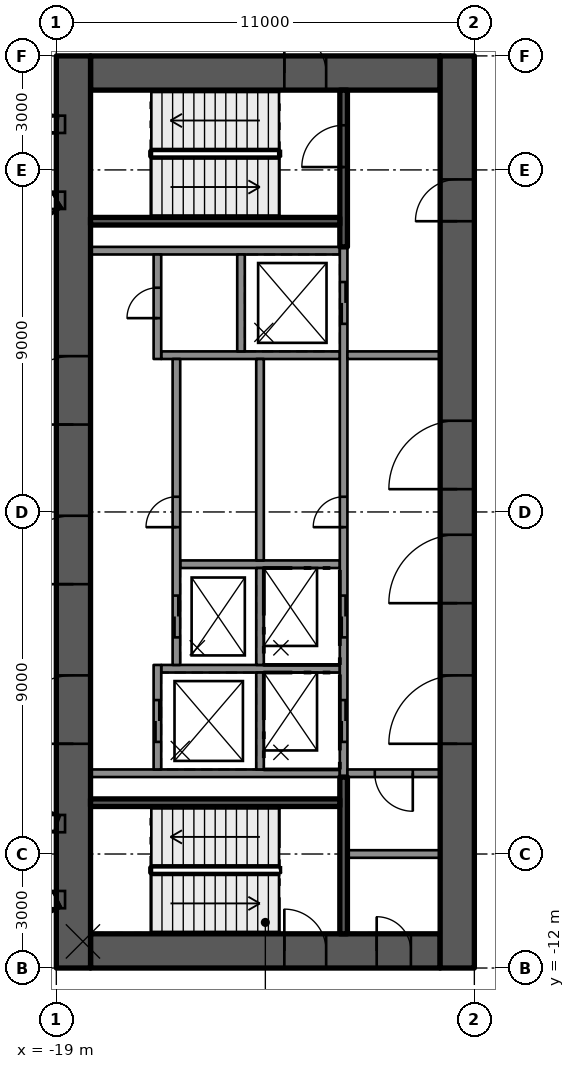
"""IFC4 building model, lengths in metres.
Left out: names, types, materials, properties, quantities, classifications, styles, units other than length and angle.
Written with IfcOpenShell. Run it as: python <this file> out.ifc"""

import sys

from ifc_helpers import new_model, si_unit, direction, frame, frame_2d, origin, place, context, subcontext, project, spatial, rectangle, extrude, element, fill, save


model = new_model("IFC4")
c1 = context("Model", 3, precision=1e-05, world=origin(), true_north=direction((0.0, 1.0)))
c2 = subcontext(c1, "Body", "Model", "MODEL_VIEW")
j1 = project(units=[si_unit("LENGTHUNIT", "METRE"), si_unit("PLANEANGLEUNIT", "RADIAN")], contexts=[c1])
p1 = place(None, origin())
s1 = spatial("IfcSite", under=j1, at=p1, CompositionType="ELEMENT")
p2 = place(p1, origin())
s2 = spatial("IfcBuilding", under=s1, at=p2, CompositionType="ELEMENT")
p3 = place(p2, frame((0.0, 0.0, 206.1)))
s3 = spatial("IfcBuildingStorey", under=s2, at=p3, CompositionType="ELEMENT", Elevation=206.1)
p4 = place(p3, frame((-18.1, 11.55, 0.0), z_axis=(0.0, 0.0, 1.0), x_axis=(1.0, 0.0, 0.0)))
e1 = element("IfcWall", 1, at=p4, inside=s3, PredefinedType="SHEAR", context=c2, shape_type="SweptSolid", body=[
    extrude(rectangle(XDim=9.2, YDim=0.9, at=frame_2d((4.6, 0.0))), origin(), (0.0, 0.0, 1.0), 4.4),
])
p5 = place(p4, frame((5.1, 0.0, 0.0)))
e2 = element("IfcOpeningElement", 2, at=p5, cuts=e1, PredefinedType="OPENING", context=c2, shape_type="SweptSolid", body=[
    extrude(rectangle(XDim=1.1, YDim=2.1, at=frame_2d((0.55, 1.05))), frame((0.0, 0.46, 0.0), z_axis=(0.0, -1.0, 0.0), x_axis=(1.0, 0.0, 0.0)), (0.0, 0.0, 1.0), 0.92),
])
p6 = place(p3, frame((-18.1, -11.55, 0.0), z_axis=(0.0, 0.0, 1.0), x_axis=(1.0, 0.0, 0.0)))
e3 = element("IfcWall", 3, at=p6, inside=s3, PredefinedType="SHEAR", context=c2, shape_type="SweptSolid", body=[
    extrude(rectangle(XDim=9.2, YDim=0.9, at=frame_2d((4.6, 0.0))), origin(), (0.0, 0.0, 1.0), 4.4),
])
p7 = place(p6, frame((5.1, 0.0, 0.0)))
e4 = element("IfcOpeningElement", 4, at=p7, cuts=e3, PredefinedType="OPENING", context=c2, shape_type="SweptSolid", body=[
    extrude(rectangle(XDim=1.1, YDim=2.1, at=frame_2d((0.55, 1.05))), frame((0.0, 0.46, 0.0), z_axis=(0.0, -1.0, 0.0), x_axis=(1.0, 0.0, 0.0)), (0.0, 0.0, 1.0), 0.92),
])
p8 = place(p6, frame((7.53, 0.0, 0.0)))
e5 = element("IfcOpeningElement", 5, at=p8, cuts=e3, PredefinedType="OPENING", context=c2, shape_type="SweptSolid", body=[
    extrude(rectangle(XDim=0.9, YDim=2.1, at=frame_2d((0.45, 1.05))), frame((0.0, 0.46, 0.0), z_axis=(0.0, -1.0, 0.0), x_axis=(1.0, 0.0, 0.0)), (0.0, 0.0, 1.0), 0.92),
])
p9 = place(p3, frame((-18.55, -12.0, 0.0), z_axis=(0.0, 0.0, 1.0), x_axis=(0.0, 1.0, 0.0)))
e6 = element("IfcWall", 6, at=p9, inside=s3, PredefinedType="SHEAR", context=c2, shape_type="SweptSolid", body=[
    extrude(rectangle(XDim=24.0, YDim=0.9, at=frame_2d((12.0, 0.0))), origin(), (0.0, 0.0, 1.0), 4.4),
])
p10 = place(p9, frame((5.9, 0.0, 0.0)))
e7 = element("IfcOpeningElement", 7, at=p10, cuts=e6, PredefinedType="OPENING", context=c2, shape_type="SweptSolid", body=[
    extrude(rectangle(XDim=1.8, YDim=2.1, at=frame_2d((0.9, 1.05))), frame((0.0, 0.46, 0.0), z_axis=(0.0, -1.0, 0.0), x_axis=(1.0, 0.0, 0.0)), (0.0, 0.0, 1.0), 0.92),
])
p11 = place(p9, frame((10.1, 0.0, 0.0)))
e8 = element("IfcOpeningElement", 8, at=p11, cuts=e6, PredefinedType="OPENING", context=c2, shape_type="SweptSolid", body=[
    extrude(rectangle(XDim=1.8, YDim=2.1, at=frame_2d((0.9, 1.05))), frame((0.0, 0.46, 0.0), z_axis=(0.0, -1.0, 0.0), x_axis=(1.0, 0.0, 0.0)), (0.0, 0.0, 1.0), 0.92),
])
p12 = place(p9, frame((14.3, 0.0, 0.0)))
e9 = element("IfcOpeningElement", 9, at=p12, cuts=e6, PredefinedType="OPENING", context=c2, shape_type="SweptSolid", body=[
    extrude(rectangle(XDim=1.8, YDim=2.1, at=frame_2d((0.9, 1.05))), frame((0.0, 0.46, 0.0), z_axis=(0.0, -1.0, 0.0), x_axis=(1.0, 0.0, 0.0)), (0.0, 0.0, 1.0), 0.92),
])
p13 = place(p3, frame((-8.45, -12.0, 0.0), z_axis=(0.0, 0.0, 1.0), x_axis=(0.0, 1.0, 0.0)))
e10 = element("IfcWall", 10, at=p13, inside=s3, PredefinedType="SHEAR", context=c2, shape_type="SweptSolid", body=[
    extrude(rectangle(XDim=24.0, YDim=0.9, at=frame_2d((12.0, 0.0))), origin(), (0.0, 0.0, 1.0), 4.4),
])
p14 = place(p13, frame((9.6, 0.0, 0.0)))
e11 = element("IfcOpeningElement", 11, at=p14, cuts=e10, PredefinedType="OPENING", context=c2, shape_type="SweptSolid", body=[
    extrude(rectangle(XDim=1.8, YDim=2.1, at=frame_2d((0.9, 1.05))), frame((0.0, 0.46, 0.0), z_axis=(0.0, -1.0, 0.0), x_axis=(1.0, 0.0, 0.0)), (0.0, 0.0, 1.0), 0.92),
])
p15 = place(p13, frame((5.9, 0.0, 0.0)))
e12 = element("IfcOpeningElement", 12, at=p15, cuts=e10, PredefinedType="OPENING", context=c2, shape_type="SweptSolid", body=[
    extrude(rectangle(XDim=1.8, YDim=2.1, at=frame_2d((0.9, 1.05))), frame((0.0, 0.46, 0.0), z_axis=(0.0, -1.0, 0.0), x_axis=(1.0, 0.0, 0.0)), (0.0, 0.0, 1.0), 0.92),
])
p16 = place(p13, frame((12.6, 0.0, 0.0)))
e13 = element("IfcOpeningElement", 13, at=p16, cuts=e10, PredefinedType="OPENING", context=c2, shape_type="SweptSolid", body=[
    extrude(rectangle(XDim=1.8, YDim=2.1, at=frame_2d((0.9, 1.05))), frame((0.0, 0.46, 0.0), z_axis=(0.0, -1.0, 0.0), x_axis=(1.0, 0.0, 0.0)), (0.0, 0.0, 1.0), 0.92),
])
p17 = place(p13, frame((19.65, 0.0, 0.0)))
e14 = element("IfcOpeningElement", 14, at=p17, cuts=e10, PredefinedType="OPENING", context=c2, shape_type="SweptSolid", body=[
    extrude(rectangle(XDim=1.1, YDim=2.1, at=frame_2d((0.55, 1.05))), frame((0.0, 0.46, 0.0), z_axis=(0.0, -1.0, 0.0), x_axis=(1.0, 0.0, 0.0)), (0.0, 0.0, 1.0), 0.92),
])
for number, where, z_axis, x_axis in (
    (15, (-11.54, 6.875, 0.0), (0.0, 0.0, 1.0), (-1.0, 0.0, 0.0)),
    (16, (-11.54, -6.875, 0.0), (0.0, 0.0, 1.0), (-1.0, 0.0, 0.0)),
):
    element("IfcWall", number, at=place(p3, frame(where, z_axis=z_axis, x_axis=x_axis)), inside=s3, PredefinedType="SOLIDWALL", context=c2, shape_type="SweptSolid", body=[
        extrude(rectangle(XDim=6.56, YDim=0.2, at=frame_2d((3.28, 0.0))), origin(), (0.0, 0.0, 1.0), 3.99),
    ])
p18 = place(p3, frame((-11.54, -4.125, 0.0), z_axis=(0.0, 0.0, 1.0), x_axis=(-1.0, 0.0, 0.0)))
e17 = element("IfcWall", 17, at=p18, inside=s3, PredefinedType="SOLIDWALL", context=c2, shape_type="SweptSolid", body=[
    extrude(rectangle(XDim=4.7, YDim=0.2, at=frame_2d((2.35, 0.0))), origin(), (0.0, 0.0, 1.0), 3.99),
])
p19 = place(p3, frame((-11.54, -1.375, 0.0), z_axis=(0.0, 0.0, 1.0), x_axis=(-1.0, 0.0, 0.0)))
e18 = element("IfcWall", 18, at=p19, inside=s3, PredefinedType="SOLIDWALL", context=c2, shape_type="SweptSolid", body=[
    extrude(rectangle(XDim=4.2, YDim=0.2, at=frame_2d((2.1, 0.0))), origin(), (0.0, 0.0, 1.0), 3.99),
])
p20 = place(p3, frame((-11.54, 4.125, 0.0), z_axis=(0.0, 0.0, 1.0), x_axis=(-1.0, 0.0, 0.0)))
e19 = element("IfcWall", 19, at=p20, inside=s3, PredefinedType="SOLIDWALL", context=c2, shape_type="SweptSolid", body=[
    extrude(rectangle(XDim=4.7, YDim=0.2, at=frame_2d((2.35, 0.0))), origin(), (0.0, 0.0, 1.0), 3.99),
])
p21 = place(p3, frame((-11.44, -6.975, 0.0), z_axis=(0.0, 0.0, 1.0), x_axis=(0.0, 1.0, 0.0)))
e20 = element("IfcWall", 20, at=p21, inside=s3, PredefinedType="SOLIDWALL", context=c2, shape_type="SweptSolid", body=[
    extrude(rectangle(XDim=13.95, YDim=0.2, at=frame_2d((6.975, 0.0))), origin(), (0.0, 0.0, 1.0), 3.99),
])
p22 = place(p21, frame((0.925, 0.0, 0.0)))
e21 = element("IfcOpeningElement", 21, at=p22, cuts=e20, PredefinedType="OPENING", context=c2, shape_type="SweptSolid", body=[
    extrude(rectangle(XDim=1.1, YDim=2.1, at=frame_2d((0.55, 1.05))), frame((0.0, 0.11, 0.0), z_axis=(0.0, -1.0, 0.0), x_axis=(1.0, 0.0, 0.0)), (0.0, 0.0, 1.0), 0.22),
])
p23 = place(p21, frame((3.675, 0.0, 0.0)))
e22 = element("IfcOpeningElement", 22, at=p23, cuts=e20, PredefinedType="OPENING", context=c2, shape_type="SweptSolid", body=[
    extrude(rectangle(XDim=1.1, YDim=2.1, at=frame_2d((0.55, 1.05))), frame((0.0, 0.11, 0.0), z_axis=(0.0, -1.0, 0.0), x_axis=(1.0, 0.0, 0.0)), (0.0, 0.0, 1.0), 0.22),
])
p24 = place(p21, frame((11.925, 0.0, 0.0)))
e23 = element("IfcOpeningElement", 23, at=p24, cuts=e20, PredefinedType="OPENING", context=c2, shape_type="SweptSolid", body=[
    extrude(rectangle(XDim=1.1, YDim=2.1, at=frame_2d((0.55, 1.05))), frame((0.0, 0.11, 0.0), z_axis=(0.0, -1.0, 0.0), x_axis=(1.0, 0.0, 0.0)), (0.0, 0.0, 1.0), 0.22),
])
p25 = place(p21, frame((6.575, 0.0, 0.0)))
e24 = element("IfcOpeningElement", 24, at=p25, cuts=e20, PredefinedType="OPENING", context=c2, shape_type="SweptSolid", body=[
    extrude(rectangle(XDim=0.8, YDim=2.1, at=frame_2d((0.4, 1.05))), frame((0.0, 0.11, 0.0), z_axis=(0.0, -1.0, 0.0), x_axis=(1.0, 0.0, 0.0)), (0.0, 0.0, 1.0), 0.22),
])
for number, where, z_axis, x_axis in (
    (25, (-13.64, -6.775, 0.0), (0.0, 0.0, 1.0), (0.0, 1.0, 0.0)),
    (26, (-13.64, -4.025, 0.0), (0.0, 0.0, 1.0), (0.0, 1.0, 0.0)),
):
    element("IfcWall", number, at=place(p3, frame(where, z_axis=z_axis, x_axis=x_axis)), inside=s3, PredefinedType="SOLIDWALL", context=c2, shape_type="SweptSolid", body=[
        extrude(rectangle(XDim=2.55, YDim=0.2, at=frame_2d((1.275, 0.0))), origin(), (0.0, 0.0, 1.0), 3.99),
    ])
p26 = place(p3, frame((-13.64, -1.275, 0.0), z_axis=(0.0, 0.0, 1.0), x_axis=(0.0, 1.0, 0.0)))
e27 = element("IfcWall", 27, at=p26, inside=s3, PredefinedType="SOLIDWALL", context=c2, shape_type="SweptSolid", body=[
    extrude(rectangle(XDim=5.3, YDim=0.2, at=frame_2d((2.65, 0.0))), origin(), (0.0, 0.0, 1.0), 3.99),
])
p27 = place(p3, frame((-14.14, 4.225, 0.0), z_axis=(0.0, 0.0, 1.0), x_axis=(0.0, 1.0, 0.0)))
e28 = element("IfcWall", 28, at=p27, inside=s3, PredefinedType="SOLIDWALL", context=c2, shape_type="SweptSolid", body=[
    extrude(rectangle(XDim=2.55, YDim=0.2, at=frame_2d((1.275, 0.0))), origin(), (0.0, 0.0, 1.0), 3.99),
])
p28 = place(p3, frame((-16.34, -6.775, 0.0), z_axis=(0.0, 0.0, 1.0), x_axis=(0.0, 1.0, 0.0)))
e29 = element("IfcWall", 29, at=p28, inside=s3, PredefinedType="SOLIDWALL", context=c2, shape_type="SweptSolid", body=[
    extrude(rectangle(XDim=2.75, YDim=0.2, at=frame_2d((1.375, 0.0))), origin(), (0.0, 0.0, 1.0), 3.99),
])
p29 = place(p28, frame((0.725, 0.0, 0.0)))
e30 = element("IfcOpeningElement", 30, at=p29, cuts=e29, PredefinedType="OPENING", context=c2, shape_type="SweptSolid", body=[
    extrude(rectangle(XDim=1.1, YDim=2.1, at=frame_2d((0.55, 1.05))), frame((0.0, 0.11, 0.0), z_axis=(0.0, -1.0, 0.0), x_axis=(1.0, 0.0, 0.0)), (0.0, 0.0, 1.0), 0.22),
])
p30 = place(p3, frame((-15.84, -4.025, 0.0), z_axis=(0.0, 0.0, 1.0), x_axis=(0.0, 1.0, 0.0)))
e31 = element("IfcWall", 31, at=p30, inside=s3, PredefinedType="SOLIDWALL", context=c2, shape_type="SweptSolid", body=[
    extrude(rectangle(XDim=8.05, YDim=0.2, at=frame_2d((4.025, 0.0))), origin(), (0.0, 0.0, 1.0), 3.99),
])
p31 = place(p30, frame((0.725, 0.0, 0.0)))
e32 = element("IfcOpeningElement", 32, at=p31, cuts=e31, PredefinedType="OPENING", context=c2, shape_type="SweptSolid", body=[
    extrude(rectangle(XDim=1.1, YDim=2.1, at=frame_2d((0.55, 1.05))), frame((0.0, 0.11, 0.0), z_axis=(0.0, -1.0, 0.0), x_axis=(1.0, 0.0, 0.0)), (0.0, 0.0, 1.0), 0.22),
])
p32 = place(p30, frame((3.625, 0.0, 0.0)))
e33 = element("IfcOpeningElement", 33, at=p32, cuts=e31, PredefinedType="OPENING", context=c2, shape_type="SweptSolid", body=[
    extrude(rectangle(XDim=0.8, YDim=2.1, at=frame_2d((0.4, 1.05))), frame((0.0, 0.11, 0.0), z_axis=(0.0, -1.0, 0.0), x_axis=(1.0, 0.0, 0.0)), (0.0, 0.0, 1.0), 0.22),
])
p33 = place(p3, frame((-16.34, 4.025, 0.0), z_axis=(0.0, 0.0, 1.0), x_axis=(0.0, 1.0, 0.0)))
e34 = element("IfcWall", 34, at=p33, inside=s3, PredefinedType="SOLIDWALL", context=c2, shape_type="SweptSolid", body=[
    extrude(rectangle(XDim=2.75, YDim=0.2, at=frame_2d((1.375, 0.0))), origin(), (0.0, 0.0, 1.0), 3.99),
])
p34 = place(p33, frame((1.075, 0.0, 0.0)))
e35 = element("IfcOpeningElement", 35, at=p34, cuts=e34, PredefinedType="OPENING", context=c2, shape_type="SweptSolid", body=[
    extrude(rectangle(XDim=0.8, YDim=2.1, at=frame_2d((0.4, 1.05))), frame((0.0, 0.11, 0.0), z_axis=(0.0, -1.0, 0.0), x_axis=(1.0, 0.0, 0.0)), (0.0, 0.0, 1.0), 0.22),
])
p35 = place(p3, frame((-11.44, 6.975, 0.0), z_axis=(0.0, 0.0, 1.0), x_axis=(0.0, 1.0, 0.0)))
e36 = element("IfcWall", 36, at=p35, inside=s3, PredefinedType="SOLIDWALL", context=c2, shape_type="SweptSolid", body=[
    extrude(rectangle(XDim=4.125, YDim=0.2, at=frame_2d((2.062, 0.0))), origin(), (0.0, 0.0, 1.0), 3.99),
])
p36 = place(p35, frame((2.1, 0.0, 0.0)))
e37 = element("IfcOpeningElement", 37, at=p36, cuts=e36, PredefinedType="OPENING", context=c2, shape_type="SweptSolid", body=[
    extrude(rectangle(XDim=1.1, YDim=2.1, at=frame_2d((0.55, 1.05))), frame((0.0, 0.11, 0.0), z_axis=(0.0, -1.0, 0.0), x_axis=(1.0, 0.0, 0.0)), (0.0, 0.0, 1.0), 0.22),
])
p37 = place(p3, frame((-11.54, 7.65, 0.0), z_axis=(0.0, 0.0, 1.0), x_axis=(-1.0, 0.0, 0.0)))
e38 = element("IfcWall", 38, at=p37, inside=s3, PredefinedType="SOLIDWALL", context=c2, shape_type="SweptSolid", body=[
    extrude(rectangle(XDim=6.56, YDim=0.2, at=frame_2d((3.28, 0.0))), origin(), (0.0, 0.0, 1.0), 3.99),
])
p38 = place(p3, frame((-11.44, -11.1, 0.0), z_axis=(0.0, 0.0, 1.0), x_axis=(0.0, 1.0, 0.0)))
e39 = element("IfcWall", 39, at=p38, inside=s3, PredefinedType="SOLIDWALL", context=c2, shape_type="SweptSolid", body=[
    extrude(rectangle(XDim=4.125, YDim=0.2, at=frame_2d((2.062, 0.0))), origin(), (0.0, 0.0, 1.0), 3.99),
])
p39 = place(p3, frame((-11.54, -7.65, 0.0), z_axis=(0.0, 0.0, 1.0), x_axis=(-1.0, 0.0, 0.0)))
e40 = element("IfcWall", 40, at=p39, inside=s3, PredefinedType="SOLIDWALL", context=c2, shape_type="SweptSolid", body=[
    extrude(rectangle(XDim=6.56, YDim=0.2, at=frame_2d((3.28, 0.0))), origin(), (0.0, 0.0, 1.0), 3.99),
])
p40 = place(p3, frame((-8.9, 4.125, 0.0), z_axis=(0.0, 0.0, 1.0), x_axis=(-1.0, 0.0, 0.0)))
e41 = element("IfcWall", 41, at=p40, inside=s3, PredefinedType="PARTITIONING", context=c2, shape_type="SweptSolid", body=[
    extrude(rectangle(XDim=2.44, YDim=0.2, at=frame_2d((1.22, 0.0))), origin(), (0.0, 0.0, 1.0), 3.99),
])
p41 = place(p3, frame((-8.9, -6.875, 0.0), z_axis=(0.0, 0.0, 1.0), x_axis=(-1.0, 0.0, 0.0)))
e42 = element("IfcWall", 42, at=p41, inside=s3, PredefinedType="PARTITIONING", context=c2, shape_type="SweptSolid", body=[
    extrude(rectangle(XDim=2.44, YDim=0.2, at=frame_2d((1.22, 0.0))), origin(), (0.0, 0.0, 1.0), 3.99),
])
p42 = place(p41, frame((0.72, 0.0, 0.0)))
e43 = element("IfcOpeningElement", 43, at=p42, cuts=e42, PredefinedType="OPENING", context=c2, shape_type="SweptSolid", body=[
    extrude(rectangle(XDim=1.0, YDim=2.1, at=frame_2d((0.5, 1.05))), frame((0.0, 0.11, 0.0), z_axis=(0.0, -1.0, 0.0), x_axis=(1.0, 0.0, 0.0)), (0.0, 0.0, 1.0), 0.22),
])
p43 = place(p3, frame((-8.9, -9.0, 0.0), z_axis=(0.0, 0.0, 1.0), x_axis=(-1.0, 0.0, 0.0)))
e44 = element("IfcWall", 44, at=p43, inside=s3, PredefinedType="PARTITIONING", context=c2, shape_type="SweptSolid", body=[
    extrude(rectangle(XDim=2.44, YDim=0.2, at=frame_2d((1.22, 0.0))), origin(), (0.0, 0.0, 1.0), 3.99),
])
p44 = place(p22, origin())
e45 = element("IfcDoor", 45, at=p44, inside=s3, OperationType="DOUBLE_DOOR_SLIDING", PredefinedType="DOOR", context=c2, shape_type="SweptSolid", body=[
    extrude(rectangle(XDim=1.1, YDim=2.1, at=frame_2d((0.55, 1.05))), frame((0.0, 0.025, 0.0), z_axis=(0.0, -1.0, 0.0), x_axis=(1.0, 0.0, 0.0)), (0.0, 0.0, 1.0), 0.05),
])
fill(e21, e45)
p45 = place(p29, origin())
e46 = element("IfcDoor", 46, at=p45, inside=s3, OperationType="DOUBLE_DOOR_SLIDING", PredefinedType="DOOR", context=c2, shape_type="SweptSolid", body=[
    extrude(rectangle(XDim=1.1, YDim=2.1, at=frame_2d((0.55, 1.05))), frame((0.0, 0.025, 0.0), z_axis=(0.0, -1.0, 0.0), x_axis=(1.0, 0.0, 0.0)), (0.0, 0.0, 1.0), 0.05),
])
fill(e30, e46)
p46 = place(p23, origin())
e47 = element("IfcDoor", 47, at=p46, inside=s3, OperationType="DOUBLE_DOOR_SLIDING", PredefinedType="DOOR", context=c2, shape_type="SweptSolid", body=[
    extrude(rectangle(XDim=1.1, YDim=2.1, at=frame_2d((0.55, 1.05))), frame((0.0, 0.025, 0.0), z_axis=(0.0, -1.0, 0.0), x_axis=(1.0, 0.0, 0.0)), (0.0, 0.0, 1.0), 0.05),
])
fill(e22, e47)
p47 = place(p31, origin())
e48 = element("IfcDoor", 48, at=p47, inside=s3, OperationType="DOUBLE_DOOR_SLIDING", PredefinedType="DOOR", context=c2, shape_type="SweptSolid", body=[
    extrude(rectangle(XDim=1.1, YDim=2.1, at=frame_2d((0.55, 1.05))), frame((0.0, 0.025, 0.0), z_axis=(0.0, -1.0, 0.0), x_axis=(1.0, 0.0, 0.0)), (0.0, 0.0, 1.0), 0.05),
])
fill(e32, e48)
p48 = place(p24, origin())
e49 = element("IfcDoor", 49, at=p48, inside=s3, OperationType="DOUBLE_DOOR_SLIDING", PredefinedType="DOOR", context=c2, shape_type="SweptSolid", body=[
    extrude(rectangle(XDim=1.1, YDim=2.1, at=frame_2d((0.55, 1.05))), frame((0.0, 0.025, 0.0), z_axis=(0.0, -1.0, 0.0), x_axis=(1.0, 0.0, 0.0)), (0.0, 0.0, 1.0), 0.05),
])
fill(e23, e49)
p49 = place(p25, origin())
e50 = element("IfcDoor", 50, at=p49, inside=s3, OperationType="SINGLE_SWING_LEFT", PredefinedType="DOOR", context=c2, shape_type="SweptSolid", body=[
    extrude(rectangle(XDim=0.8, YDim=2.1, at=frame_2d((0.4, 1.05))), frame((0.0, 0.025, 0.0), z_axis=(0.0, -1.0, 0.0), x_axis=(1.0, 0.0, 0.0)), (0.0, 0.0, 1.0), 0.05),
])
fill(e24, e50)
p50 = place(p32, origin())
e51 = element("IfcDoor", 51, at=p50, inside=s3, OperationType="SINGLE_SWING_LEFT", PredefinedType="DOOR", context=c2, shape_type="SweptSolid", body=[
    extrude(rectangle(XDim=0.8, YDim=2.1, at=frame_2d((0.4, 1.05))), frame((0.0, 0.025, 0.0), z_axis=(0.0, -1.0, 0.0), x_axis=(1.0, 0.0, 0.0)), (0.0, 0.0, 1.0), 0.05),
])
fill(e33, e51)
p51 = place(p34, origin())
e52 = element("IfcDoor", 52, at=p51, inside=s3, OperationType="SINGLE_SWING_LEFT", PredefinedType="DOOR", context=c2, shape_type="SweptSolid", body=[
    extrude(rectangle(XDim=0.8, YDim=2.1, at=frame_2d((0.4, 1.05))), frame((0.0, 0.025, 0.0), z_axis=(0.0, -1.0, 0.0), x_axis=(1.0, 0.0, 0.0)), (0.0, 0.0, 1.0), 0.05),
])
fill(e35, e52)
p52 = place(p14, origin())
e53 = element("IfcDoor", 53, at=p52, inside=s3, OperationType="SINGLE_SWING_LEFT", PredefinedType="DOOR", context=c2, shape_type="SweptSolid", body=[
    extrude(rectangle(XDim=1.8, YDim=2.1, at=frame_2d((0.9, 1.05))), frame((0.0, 0.025, 0.0), z_axis=(0.0, -1.0, 0.0), x_axis=(1.0, 0.0, 0.0)), (0.0, 0.0, 1.0), 0.05),
])
fill(e11, e53)
p53 = place(p10, origin())
e54 = element("IfcDoor", 54, at=p53, inside=s3, OperationType="SINGLE_SWING_LEFT", PredefinedType="DOOR", context=c2, shape_type="SweptSolid", body=[
    extrude(rectangle(XDim=1.8, YDim=2.1, at=frame_2d((0.9, 1.05))), frame((0.0, 0.025, 0.0), z_axis=(0.0, -1.0, 0.0), x_axis=(1.0, 0.0, 0.0)), (0.0, 0.0, 1.0), 0.05),
])
fill(e7, e54)
p54 = place(p11, origin())
e55 = element("IfcDoor", 55, at=p54, inside=s3, OperationType="SINGLE_SWING_LEFT", PredefinedType="DOOR", context=c2, shape_type="SweptSolid", body=[
    extrude(rectangle(XDim=1.8, YDim=2.1, at=frame_2d((0.9, 1.05))), frame((0.0, 0.025, 0.0), z_axis=(0.0, -1.0, 0.0), x_axis=(1.0, 0.0, 0.0)), (0.0, 0.0, 1.0), 0.05),
])
fill(e8, e55)
p55 = place(p12, origin())
e56 = element("IfcDoor", 56, at=p55, inside=s3, OperationType="SINGLE_SWING_RIGHT", PredefinedType="DOOR", context=c2, shape_type="SweptSolid", body=[
    extrude(rectangle(XDim=1.8, YDim=2.1, at=frame_2d((0.9, 1.05))), frame((0.0, 0.025, 0.0), z_axis=(0.0, -1.0, 0.0), x_axis=(1.0, 0.0, 0.0)), (0.0, 0.0, 1.0), 0.05),
])
fill(e9, e56)
p56 = place(p15, origin())
e57 = element("IfcDoor", 57, at=p56, inside=s3, OperationType="SINGLE_SWING_LEFT", PredefinedType="DOOR", context=c2, shape_type="SweptSolid", body=[
    extrude(rectangle(XDim=1.8, YDim=2.1, at=frame_2d((0.9, 1.05))), frame((0.0, 0.025, 0.0), z_axis=(0.0, -1.0, 0.0), x_axis=(1.0, 0.0, 0.0)), (0.0, 0.0, 1.0), 0.05),
])
fill(e12, e57)
p57 = place(p16, origin())
e58 = element("IfcDoor", 58, at=p57, inside=s3, OperationType="SINGLE_SWING_RIGHT", PredefinedType="DOOR", context=c2, shape_type="SweptSolid", body=[
    extrude(rectangle(XDim=1.8, YDim=2.1, at=frame_2d((0.9, 1.05))), frame((0.0, 0.025, 0.0), z_axis=(0.0, -1.0, 0.0), x_axis=(1.0, 0.0, 0.0)), (0.0, 0.0, 1.0), 0.05),
])
fill(e13, e58)
p58 = place(p17, origin())
e59 = element("IfcDoor", 59, at=p58, inside=s3, OperationType="SINGLE_SWING_RIGHT", PredefinedType="DOOR", context=c2, shape_type="SweptSolid", body=[
    extrude(rectangle(XDim=1.1, YDim=2.1, at=frame_2d((0.55, 1.05))), frame((0.0, 0.025, 0.0), z_axis=(0.0, -1.0, 0.0), x_axis=(1.0, 0.0, 0.0)), (0.0, 0.0, 1.0), 0.05),
])
fill(e14, e59)
p59 = place(p5, origin())
e60 = element("IfcDoor", 60, at=p59, inside=s3, OperationType="SINGLE_SWING_RIGHT", PredefinedType="DOOR", context=c2, shape_type="SweptSolid", body=[
    extrude(rectangle(XDim=1.1, YDim=2.1, at=frame_2d((0.55, 1.05))), frame((0.0, 0.025, 0.0), z_axis=(0.0, -1.0, 0.0), x_axis=(1.0, 0.0, 0.0)), (0.0, 0.0, 1.0), 0.05),
])
fill(e2, e60)
p60 = place(p7, origin())
e61 = element("IfcDoor", 61, at=p60, inside=s3, OperationType="SINGLE_SWING_RIGHT", PredefinedType="DOOR", context=c2, shape_type="SweptSolid", body=[
    extrude(rectangle(XDim=1.1, YDim=2.1, at=frame_2d((0.55, 1.05))), frame((0.0, 0.025, 0.0), z_axis=(0.0, -1.0, 0.0), x_axis=(1.0, 0.0, 0.0)), (0.0, 0.0, 1.0), 0.05),
])
fill(e4, e61)
p61 = place(p36, origin())
e62 = element("IfcDoor", 62, at=p61, inside=s3, OperationType="SINGLE_SWING_RIGHT", PredefinedType="DOOR", context=c2, shape_type="SweptSolid", body=[
    extrude(rectangle(XDim=1.1, YDim=2.1, at=frame_2d((0.55, 1.05))), frame((0.0, 0.025, 0.0), z_axis=(0.0, -1.0, 0.0), x_axis=(1.0, 0.0, 0.0)), (0.0, 0.0, 1.0), 0.05),
])
fill(e37, e62)
p62 = place(p8, origin())
e63 = element("IfcDoor", 63, at=p62, inside=s3, OperationType="SINGLE_SWING_RIGHT", PredefinedType="DOOR", context=c2, shape_type="SweptSolid", body=[
    extrude(rectangle(XDim=0.9, YDim=2.1, at=frame_2d((0.45, 1.05))), frame((0.0, 0.025, 0.0), z_axis=(0.0, -1.0, 0.0), x_axis=(1.0, 0.0, 0.0)), (0.0, 0.0, 1.0), 0.05),
])
fill(e5, e63)
p63 = place(p42, origin())
e64 = element("IfcDoor", 64, at=p63, inside=s3, OperationType="SINGLE_SWING_RIGHT", PredefinedType="DOOR", context=c2, shape_type="SweptSolid", body=[
    extrude(rectangle(XDim=1.0, YDim=2.1, at=frame_2d((0.5, 1.05))), frame((0.0, 0.025, 0.0), z_axis=(0.0, -1.0, 0.0), x_axis=(1.0, 0.0, 0.0)), (0.0, 0.0, 1.0), 0.05),
])
fill(e43, e64)
save(model, sys.argv[1])
